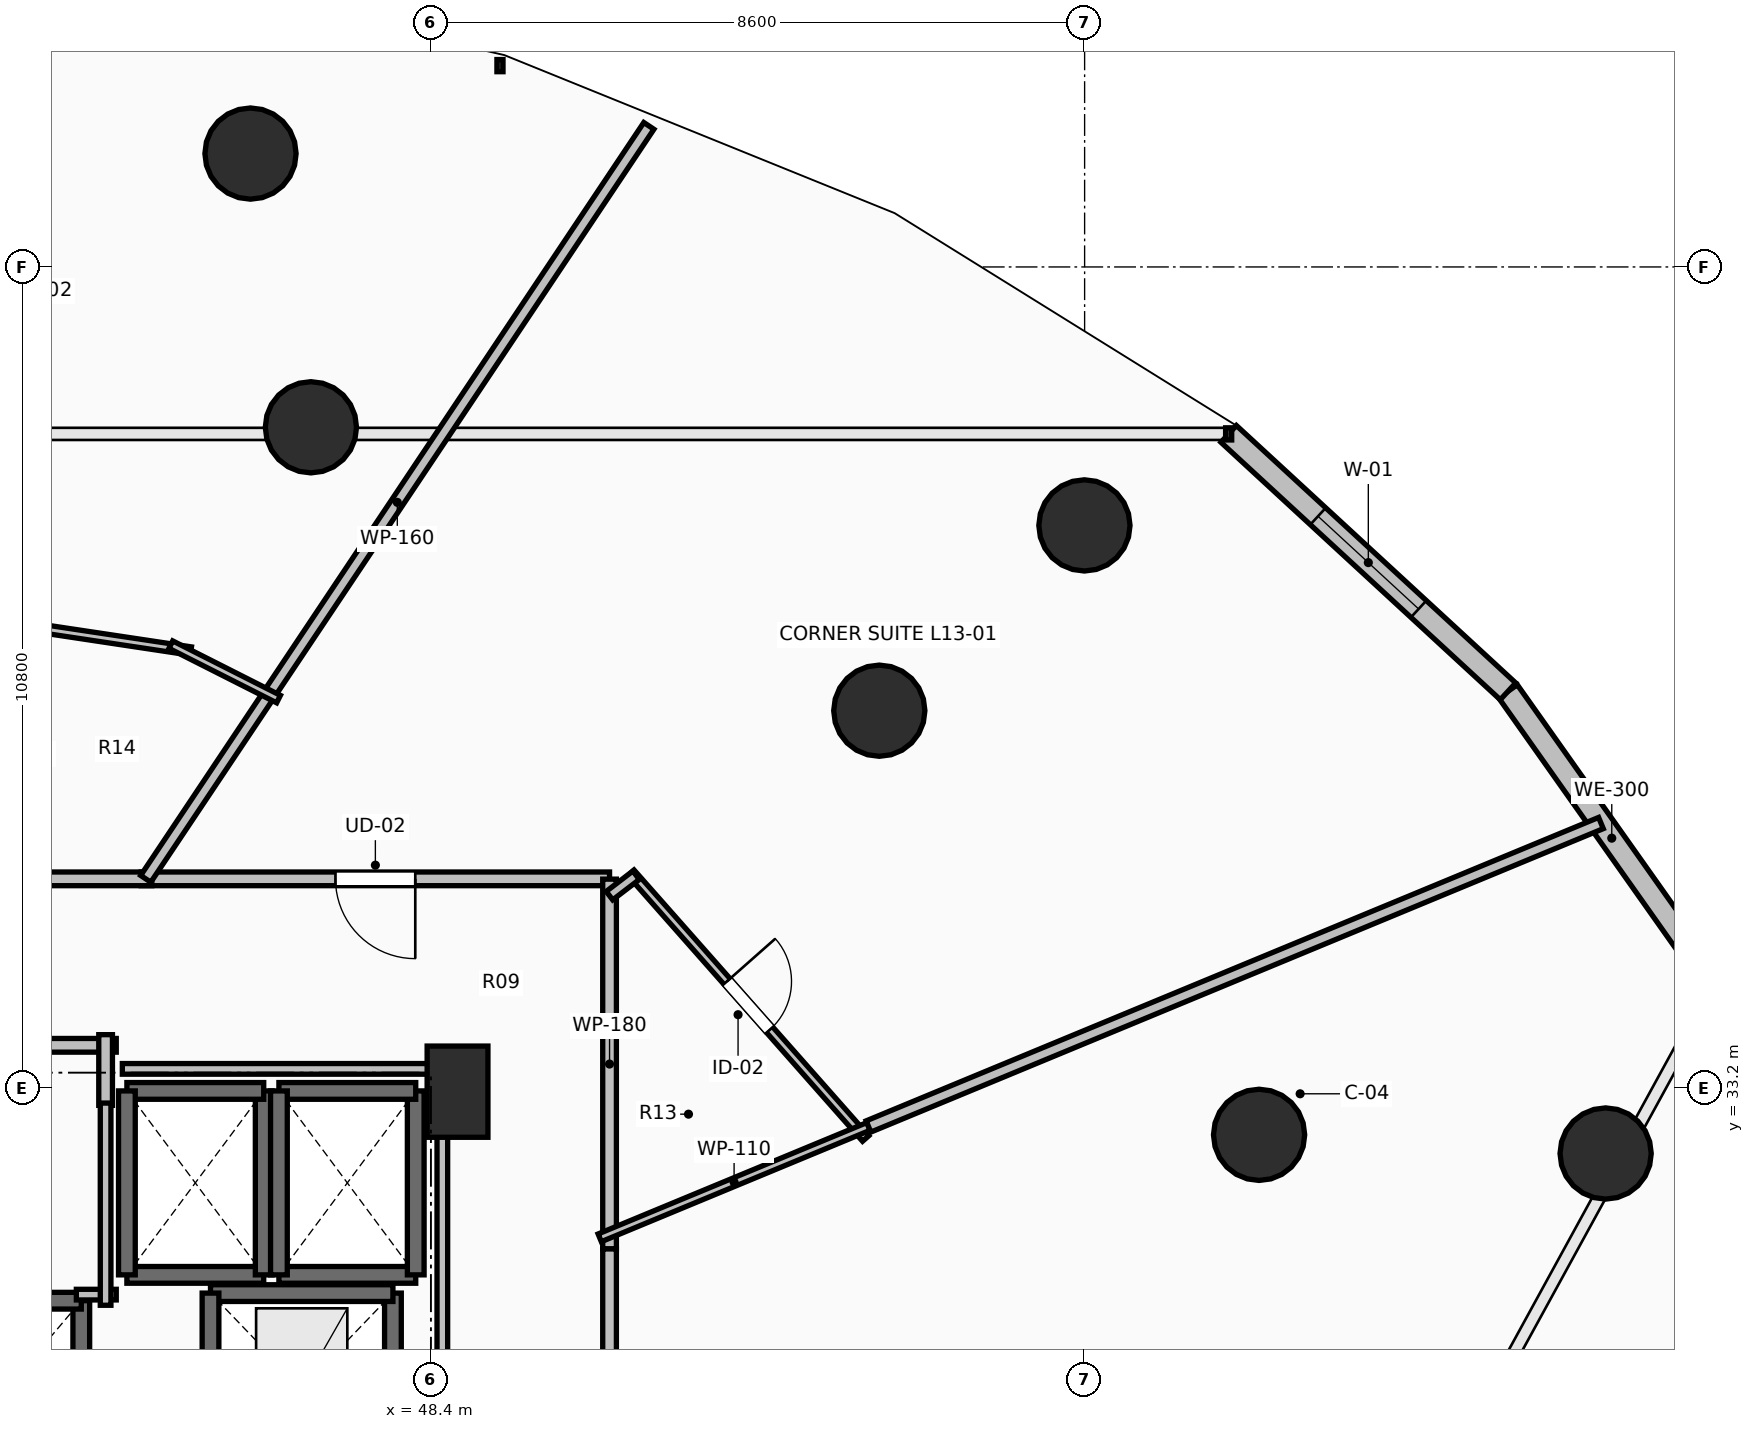
"""IFC4 building model, lengths in metres.
Left out: names, types, materials, properties, quantities, classifications, styles, units other than length and angle.
Written with IfcOpenShell. Run it as: python <this file> out.ifc"""

import sys

from ifc_helpers import new_model, si_unit, direction, frame, frame_2d, origin, origin_2d, place, context, subcontext, project, spatial, rectangle, circle, extrude, element, fill, save


model = new_model("IFC4")
c1 = context("Model", 3, precision=1e-05, world=origin(), true_north=direction((0.0, 1.0)))
c2 = subcontext(c1, "Body", "Model", "MODEL_VIEW")
j1 = project(units=[si_unit("LENGTHUNIT", "METRE"), si_unit("PLANEANGLEUNIT", "RADIAN")], contexts=[c1])
p1 = place(None, origin())
s1 = spatial("IfcSite", under=j1, at=p1, CompositionType="ELEMENT")
p2 = place(p1, origin())
s2 = spatial("IfcBuilding", under=s1, at=p2, CompositionType="ELEMENT")
p3 = place(p2, frame((0.0, 0.0, 52.0)))
s3 = spatial("IfcBuildingStorey", under=s2, at=p3, CompositionType="ELEMENT", Elevation=52.0)
for number, where, z_axis, x_axis in (
    (1, (59.295, 32.582, 0.0), (0.0, 0.0, 1.0), (0.924, 0.383, 0.0)),
    (2, (54.299, 38.162, 0.0), (0.0, 0.0, 1.0), (0.707, 0.707, 0.0)),
    (3, (46.821, 41.891, 0.0), (0.0, 0.0, 1.0), (0.383, 0.924, 0.0)),
    (4, (63.854, 32.337, 0.0), (0.0, 0.0, 1.0), (0.924, 0.383, 0.0)),
    (5, (56.997, 40.6, 0.0), (0.0, 0.0, 1.0), (0.707, 0.707, 0.0)),
    (6, (46.026, 45.492, 0.0), (0.0, 0.0, 1.0), (0.383, 0.924, 0.0)),
):
    element("IfcColumn", number, at=place(p3, frame(where, z_axis=z_axis, x_axis=x_axis)), inside=s3, PredefinedType="COLUMN", context=c2, shape_type="SweptSolid", body=[
        extrude(circle(Radius=0.6, at=origin_2d()), origin(), (0.0, 0.0, 1.0), 3.5),
    ])
p4 = place(p3, frame((48.75, 33.15, 0.0), z_axis=(0.0, 0.0, 1.0), x_axis=(1.0, 0.0, 0.0)))
e7 = element("IfcColumn", 7, at=p4, inside=s3, PredefinedType="PILASTER", context=c2, shape_type="SweptSolid", body=[
    extrude(rectangle(XDim=0.8, YDim=1.2, at=origin_2d()), origin(), (0.0, 0.0, 1.0), 3.5),
])
p5 = place(p3, frame((65.301, 34.553, 0.0), z_axis=(0.0, 0.0, 1.0), x_axis=(-0.577130815624, 0.816651713803, 0.0)))
e8 = element("IfcWall", 8, at=p5, inside=s3, PredefinedType="STANDARD", context=c2, shape_type="SweptSolid", body=[
    extrude(rectangle(XDim=4.731, YDim=0.3, at=frame_2d((2.366, 0.0))), origin(), (0.0, 0.0, 1.0), 3.24),
])
p6 = place(p3, frame((62.57, 38.417, 0.0), z_axis=(0.0, 0.0, 1.0), x_axis=(-0.735342629635, 0.677695519419, 0.0)))
e9 = element("IfcWall", 9, at=p6, inside=s3, PredefinedType="STANDARD", context=c2, shape_type="SweptSolid", body=[
    extrude(rectangle(XDim=4.997, YDim=0.3, at=frame_2d((2.499, 0.0))), origin(), (0.0, 0.0, 1.0), 3.24),
])
p7 = place(p6, frame((1.599, 0.0, 0.85)))
e10 = element("IfcOpeningElement", 10, at=p7, cuts=e9, PredefinedType="OPENING", context=c2, shape_type="SweptSolid", body=[
    extrude(rectangle(XDim=1.8, YDim=2.19, at=frame_2d((0.9, 1.095))), frame((0.0, 0.165, 0.0), z_axis=(0.0, -1.0, 0.0), x_axis=(1.0, 0.0, 0.0)), (0.0, 0.0, 1.0), 0.33),
])
p8 = place(p3, frame((43.8, 27.8, 0.0), z_axis=(0.0, 0.0, 1.0), x_axis=(0.0, 1.0, 0.0)))
e11 = element("IfcWall", 11, at=p8, inside=s3, PredefinedType="SOLIDWALL", context=c2, shape_type="SweptSolid", body=[
    extrude(rectangle(XDim=2.6, YDim=0.22, at=frame_2d((1.3, 0.0))), origin(), (0.0, 0.0, 1.0), 3.24),
])
p9 = place(p3, frame((43.8, 30.4, 0.0), z_axis=(0.0, 0.0, 1.0), x_axis=(-1.0, 0.0, 0.0)))
e12 = element("IfcWall", 12, at=p9, inside=s3, PredefinedType="SOLIDWALL", context=c2, shape_type="SweptSolid", body=[
    extrude(rectangle(XDim=2.2, YDim=0.22, at=frame_2d((1.1, 0.0))), origin(), (0.0, 0.0, 1.0), 3.24),
])
p10 = place(p3, frame((44.4, 30.74, 0.0), z_axis=(0.0, 0.0, 1.0), x_axis=(1.0, 0.0, 0.0)))
e13 = element("IfcWall", 13, at=p10, inside=s3, PredefinedType="SOLIDWALL", context=c2, shape_type="SweptSolid", body=[
    extrude(rectangle(XDim=1.8, YDim=0.22, at=frame_2d((0.9, 0.0))), origin(), (0.0, 0.0, 1.0), 3.24),
])
p11 = place(p3, frame((46.2, 30.74, 0.0), z_axis=(0.0, 0.0, 1.0), x_axis=(0.0, 1.0, 0.0)))
e14 = element("IfcWall", 14, at=p11, inside=s3, PredefinedType="SOLIDWALL", context=c2, shape_type="SweptSolid", body=[
    extrude(rectangle(XDim=2.42, YDim=0.22, at=frame_2d((1.21, 0.0))), origin(), (0.0, 0.0, 1.0), 3.24),
])
p12 = place(p3, frame((46.2, 33.16, 0.0), z_axis=(0.0, 0.0, 1.0), x_axis=(-1.0, 0.0, 0.0)))
e15 = element("IfcWall", 15, at=p12, inside=s3, PredefinedType="SOLIDWALL", context=c2, shape_type="SweptSolid", body=[
    extrude(rectangle(XDim=1.8, YDim=0.22, at=frame_2d((0.9, 0.0))), origin(), (0.0, 0.0, 1.0), 3.24),
])
p13 = place(p3, frame((44.4, 33.16, 0.0), z_axis=(0.0, 0.0, 1.0), x_axis=(0.0, -1.0, 0.0)))
e16 = element("IfcWall", 16, at=p13, inside=s3, PredefinedType="SOLIDWALL", context=c2, shape_type="SweptSolid", body=[
    extrude(rectangle(XDim=2.42, YDim=0.22, at=frame_2d((1.21, 0.0))), origin(), (0.0, 0.0, 1.0), 3.24),
])
p14 = place(p3, frame((46.4, 30.74, 0.0), z_axis=(0.0, 0.0, 1.0), x_axis=(1.0, 0.0, 0.0)))
e17 = element("IfcWall", 17, at=p14, inside=s3, PredefinedType="SOLIDWALL", context=c2, shape_type="SweptSolid", body=[
    extrude(rectangle(XDim=1.8, YDim=0.22, at=frame_2d((0.9, 0.0))), origin(), (0.0, 0.0, 1.0), 3.24),
])
p15 = place(p3, frame((48.2, 30.74, 0.0), z_axis=(0.0, 0.0, 1.0), x_axis=(0.0, 1.0, 0.0)))
e18 = element("IfcWall", 18, at=p15, inside=s3, PredefinedType="SOLIDWALL", context=c2, shape_type="SweptSolid", body=[
    extrude(rectangle(XDim=2.42, YDim=0.22, at=frame_2d((1.21, 0.0))), origin(), (0.0, 0.0, 1.0), 3.24),
])
p16 = place(p3, frame((48.2, 33.16, 0.0), z_axis=(0.0, 0.0, 1.0), x_axis=(-1.0, 0.0, 0.0)))
e19 = element("IfcWall", 19, at=p16, inside=s3, PredefinedType="SOLIDWALL", context=c2, shape_type="SweptSolid", body=[
    extrude(rectangle(XDim=1.8, YDim=0.22, at=frame_2d((0.9, 0.0))), origin(), (0.0, 0.0, 1.0), 3.24),
])
p17 = place(p3, frame((46.4, 33.16, 0.0), z_axis=(0.0, 0.0, 1.0), x_axis=(0.0, -1.0, 0.0)))
e20 = element("IfcWall", 20, at=p17, inside=s3, PredefinedType="SOLIDWALL", context=c2, shape_type="SweptSolid", body=[
    extrude(rectangle(XDim=2.42, YDim=0.22, at=frame_2d((1.21, 0.0))), origin(), (0.0, 0.0, 1.0), 3.24),
])
p18 = place(p3, frame((47.9, 28.0, 0.0), z_axis=(0.0, 0.0, 1.0), x_axis=(0.0, 1.0, 0.0)))
e21 = element("IfcWall", 21, at=p18, inside=s3, PredefinedType="SHEAR", context=c2, shape_type="SweptSolid", body=[
    extrude(rectangle(XDim=2.5, YDim=0.22, at=frame_2d((1.25, 0.0))), origin(), (0.0, 0.0, 1.0), 3.24),
])
p19 = place(p3, frame((47.9, 30.5, 0.0), z_axis=(0.0, 0.0, 1.0), x_axis=(-1.0, 0.0, 0.0)))
e22 = element("IfcWall", 22, at=p19, inside=s3, PredefinedType="SHEAR", context=c2, shape_type="SweptSolid", body=[
    extrude(rectangle(XDim=2.4, YDim=0.22, at=frame_2d((1.2, 0.0))), origin(), (0.0, 0.0, 1.0), 3.24),
])
p20 = place(p3, frame((45.5, 30.5, 0.0), z_axis=(0.0, 0.0, 1.0), x_axis=(0.0, -1.0, 0.0)))
e23 = element("IfcWall", 23, at=p20, inside=s3, PredefinedType="SHEAR", context=c2, shape_type="SweptSolid", body=[
    extrude(rectangle(XDim=2.5, YDim=0.22, at=frame_2d((1.25, 0.0))), origin(), (0.0, 0.0, 1.0), 3.24),
])
p21 = place(p3, frame((44.26, 33.76, 0.0), z_axis=(0.0, 0.0, 1.0), x_axis=(-1.0, 0.0, 0.0)))
e24 = element("IfcWall", 24, at=p21, inside=s3, PredefinedType="PARTITIONING", context=c2, shape_type="SweptSolid", body=[
    extrude(rectangle(XDim=4.61, YDim=0.18, at=frame_2d((2.305, 0.0))), origin(), (0.0, 0.0, 1.0), 3.24),
])
p22 = place(p21, frame((1.88, 0.0, 0.0)))
e25 = element("IfcOpeningElement", 25, at=p22, cuts=e24, PredefinedType="OPENING", context=c2, shape_type="SweptSolid", body=[
    extrude(rectangle(XDim=0.85, YDim=2.1, at=frame_2d((0.425, 1.05))), frame((0.0, 0.105, 0.0), z_axis=(0.0, -1.0, 0.0), x_axis=(1.0, 0.0, 0.0)), (0.0, 0.0, 1.0), 0.21),
])
p23 = place(p3, frame((44.12, 32.97, 0.0), z_axis=(0.0, 0.0, 1.0), x_axis=(0.0, 1.0, 0.0)))
e26 = element("IfcWall", 26, at=p23, inside=s3, PredefinedType="PARTITIONING", context=c2, shape_type="SweptSolid", body=[
    extrude(rectangle(XDim=0.93, YDim=0.18, at=frame_2d((0.465, 0.0))), origin(), (0.0, 0.0, 1.0), 3.24),
])
p24 = place(p3, frame((50.75, 35.95, 0.0), z_axis=(0.0, 0.0, 1.0), x_axis=(-1.0, 0.0, 0.0)))
e27 = element("IfcWall", 27, at=p24, inside=s3, PredefinedType="PARTITIONING", context=c2, shape_type="SweptSolid", body=[
    extrude(rectangle(XDim=6.162, YDim=0.18, at=frame_2d((3.081, 0.0))), origin(), (0.0, 0.0, 1.0), 2.432),
])
p25 = place(p24, frame((2.556, 0.0, 0.0)))
e28 = element("IfcOpeningElement", 28, at=p25, cuts=e27, PredefinedType="OPENING", context=c2, shape_type="SweptSolid", body=[
    extrude(rectangle(XDim=1.05, YDim=2.2, at=frame_2d((0.525, 1.1))), frame((0.0, 0.105, 0.0), z_axis=(0.0, -1.0, 0.0), x_axis=(1.0, 0.0, 0.0)), (0.0, 0.0, 1.0), 0.21),
])
p26 = place(p3, frame((50.75, 31.081, 0.0), z_axis=(0.0, 0.0, 1.0), x_axis=(0.0, 1.0, 0.0)))
e29 = element("IfcWall", 29, at=p26, inside=s3, PredefinedType="PARTITIONING", context=c2, shape_type="SweptSolid", body=[
    extrude(rectangle(XDim=4.865, YDim=0.18, at=frame_2d((2.433, 0.0))), origin(), (0.0, 0.0, 1.0), 2.432),
])
p27 = place(p3, frame((44.728, 35.95, 0.0), z_axis=(0.0, 0.0, 1.0), x_axis=(-1.0, 0.0, 0.0)))
e30 = element("IfcWall", 30, at=p27, inside=s3, PredefinedType="PARTITIONING", context=c2, shape_type="SweptSolid", body=[
    extrude(rectangle(XDim=3.398, YDim=0.18, at=frame_2d((1.699, 0.0))), origin(), (0.0, 0.0, 1.0), 3.24),
])
p28 = place(p3, frame((50.75, 20.779, 0.0), z_axis=(0.0, 0.0, 1.0), x_axis=(0.0, 1.0, 0.0)))
e31 = element("IfcWall", 31, at=p28, inside=s3, PredefinedType="PARTITIONING", context=c2, shape_type="SweptSolid", body=[
    extrude(rectangle(XDim=10.302, YDim=0.18, at=frame_2d((5.151, 0.0))), origin(), (0.0, 0.0, 1.0), 2.432),
])
p29 = place(p28, frame((4.651, 0.0, 0.0)))
e32 = element("IfcOpeningElement", 32, at=p29, cuts=e31, PredefinedType="OPENING", context=c2, shape_type="SweptSolid", body=[
    extrude(rectangle(XDim=1.0, YDim=2.15, at=frame_2d((0.5, 1.075))), frame((0.0, 0.105, 0.0), z_axis=(0.0, -1.0, 0.0), x_axis=(1.0, 0.0, 0.0)), (0.0, 0.0, 1.0), 0.21),
])
p30 = place(p3, frame((51.031, 36.03, 0.0), z_axis=(0.0, 0.0, 1.0), x_axis=(0.662106207726, -0.749410014405, 0.0)))
e33 = element("IfcWall", 33, at=p30, inside=s3, PredefinedType="PARTITIONING", context=c2, shape_type="SweptSolid", body=[
    extrude(rectangle(XDim=4.665, YDim=0.11, at=frame_2d((2.332, 0.0))), origin(), (0.0, 0.0, 1.0), 2.432),
])
p31 = place(p30, frame((1.907, 0.0, 0.0)))
e34 = element("IfcOpeningElement", 34, at=p31, cuts=e33, PredefinedType="OPENING", context=c2, shape_type="SweptSolid", body=[
    extrude(rectangle(XDim=0.85, YDim=2.1, at=frame_2d((0.425, 1.05))), frame((0.0, 0.07, 0.0), z_axis=(0.0, -1.0, 0.0), x_axis=(1.0, 0.0, 0.0)), (0.0, 0.0, 1.0), 0.14),
])
p32 = place(p3, frame((54.156, 32.693, 0.0), z_axis=(0.0, 0.0, 1.0), x_axis=(-0.923803754276, -0.382866326002, 0.0)))
e35 = element("IfcWall", 35, at=p32, inside=s3, PredefinedType="PARTITIONING", context=c2, shape_type="SweptSolid", body=[
    extrude(rectangle(XDim=3.827, YDim=0.11, at=frame_2d((1.914, 0.0))), origin(), (0.0, 0.0, 1.0), 2.432),
])
p33 = place(p3, frame((51.267, 45.856, 0.0), z_axis=(0.0, 0.0, 1.0), x_axis=(-0.55557946655, -0.831463442581, 0.0)))
e36 = element("IfcWall", 36, at=p33, inside=s3, PredefinedType="PARTITIONING", context=c2, shape_type="SweptSolid", body=[
    extrude(rectangle(XDim=11.914, YDim=0.16, at=frame_2d((5.957, 0.0))), origin(), (0.0, 0.0, 1.0), 2.432),
])
p34 = place(p3, frame((54.156, 32.692, 0.0), z_axis=(0.0, 0.0, 1.0), x_axis=(0.923866486063, 0.38271492776, 0.0)))
e37 = element("IfcWall", 37, at=p34, inside=s3, PredefinedType="PARTITIONING", context=c2, shape_type="SweptSolid", body=[
    extrude(rectangle(XDim=10.431, YDim=0.16, at=frame_2d((5.215, 0.0))), origin(), (0.0, 0.0, 1.0), 2.432),
])
p35 = place(p3, frame((42.432, 39.37, 0.0), z_axis=(0.0, 0.0, 1.0), x_axis=(0.988877663763, -0.148731187416, 0.0)))
e38 = element("IfcWall", 38, at=p35, inside=s3, PredefinedType="PARTITIONING", context=c2, shape_type="SweptSolid", body=[
    extrude(rectangle(XDim=2.841, YDim=0.11, at=frame_2d((1.421, 0.0))), origin(), (0.0, 0.0, 1.0), 3.24),
])
p36 = place(p3, frame((44.978, 39.031, 0.0), z_axis=(0.0, 0.0, 1.0), x_axis=(0.892388427115, -0.451268096758, 0.0)))
e39 = element("IfcWall", 39, at=p36, inside=s3, PredefinedType="PARTITIONING", context=c2, shape_type="SweptSolid", body=[
    extrude(rectangle(XDim=1.588, YDim=0.11, at=frame_2d((0.794, 0.0))), origin(), (0.0, 0.0, 1.0), 3.24),
])
p37 = place(p3, frame((43.735, 30.48, 0.0), z_axis=(0.0, 0.0, 1.0), x_axis=(1.0, 0.0, 0.0)))
e40 = element("IfcWall", 40, at=p37, inside=s3, PredefinedType="PARTITIONING", context=c2, shape_type="SweptSolid", body=[
    extrude(rectangle(XDim=0.525, YDim=0.14, at=frame_2d((0.262, 0.0))), origin(), (0.0, 0.0, 1.0), 3.24),
])
p38 = place(p3, frame((44.12, 30.34, 0.0), z_axis=(0.0, 0.0, 1.0), x_axis=(0.0, 1.0, 0.0)))
e41 = element("IfcWall", 41, at=p38, inside=s3, PredefinedType="PARTITIONING", context=c2, shape_type="SweptSolid", body=[
    extrude(rectangle(XDim=2.66, YDim=0.14, at=frame_2d((1.33, 0.0))), origin(), (0.0, 0.0, 1.0), 3.24),
])
p39 = place(p3, frame((44.34, 33.45, 0.0), z_axis=(0.0, 0.0, 1.0), x_axis=(1.0, 0.0, 0.0)))
e42 = element("IfcWall", 42, at=p39, inside=s3, PredefinedType="PARTITIONING", context=c2, shape_type="SweptSolid", body=[
    extrude(rectangle(XDim=4.21, YDim=0.14, at=frame_2d((2.105, 0.0))), origin(), (0.0, 0.0, 1.0), 2.432),
])
p40 = place(p3, frame((48.55, 33.45, 0.0), z_axis=(0.0, 0.0, 1.0), x_axis=(0.0, -1.0, 0.0)))
e43 = element("IfcWall", 43, at=p40, inside=s3, PredefinedType="PARTITIONING", context=c2, shape_type="SweptSolid", body=[
    extrude(rectangle(XDim=5.254, YDim=0.14, at=frame_2d((2.627, 0.0))), origin(), (0.0, 0.0, 1.0), 2.432),
])
p41 = place(p3, frame((51.099, 35.997, 0.0), z_axis=(0.0, 0.0, 1.0), x_axis=(-0.794185002189, -0.607676050456, 0.0)))
e44 = element("IfcWall", 44, at=p41, inside=s3, PredefinedType="PARTITIONING", context=c2, shape_type="SweptSolid", body=[
    extrude(rectangle(XDim=0.441, YDim=0.14, at=frame_2d((0.221, 0.0))), origin(), (0.0, 0.0, 1.0), 2.886),
])
p42 = place(p7, origin())
e45 = element("IfcWindow", 45, at=p42, inside=s3, PartitioningType="SINGLE_PANEL", PredefinedType="WINDOW", context=c2, shape_type="SweptSolid", body=[
    extrude(rectangle(XDim=1.8, YDim=2.19, at=frame_2d((0.9, 1.095))), frame((0.0, 0.03, 0.0), z_axis=(0.0, -1.0, 0.0), x_axis=(1.0, 0.0, 0.0)), (0.0, 0.0, 1.0), 0.06),
])
fill(e10, e45)
p43 = place(p25, origin())
e46 = element("IfcDoor", 46, at=p43, inside=s3, OperationType="SINGLE_SWING_LEFT", PredefinedType="DOOR", context=c2, shape_type="SweptSolid", body=[
    extrude(rectangle(XDim=1.05, YDim=2.2, at=frame_2d((0.525, 1.1))), frame((0.0, 0.025, 0.0), z_axis=(0.0, -1.0, 0.0), x_axis=(1.0, 0.0, 0.0)), (0.0, 0.0, 1.0), 0.05),
])
fill(e28, e46)
p44 = place(p31, origin())
e47 = element("IfcDoor", 47, at=p44, inside=s3, OperationType="SINGLE_SWING_LEFT", PredefinedType="DOOR", context=c2, shape_type="SweptSolid", body=[
    extrude(rectangle(XDim=0.85, YDim=2.1, at=frame_2d((0.425, 1.05))), frame((0.0, 0.025, 0.0), z_axis=(0.0, -1.0, 0.0), x_axis=(1.0, 0.0, 0.0)), (0.0, 0.0, 1.0), 0.05),
])
fill(e34, e47)
save(model, sys.argv[1])
